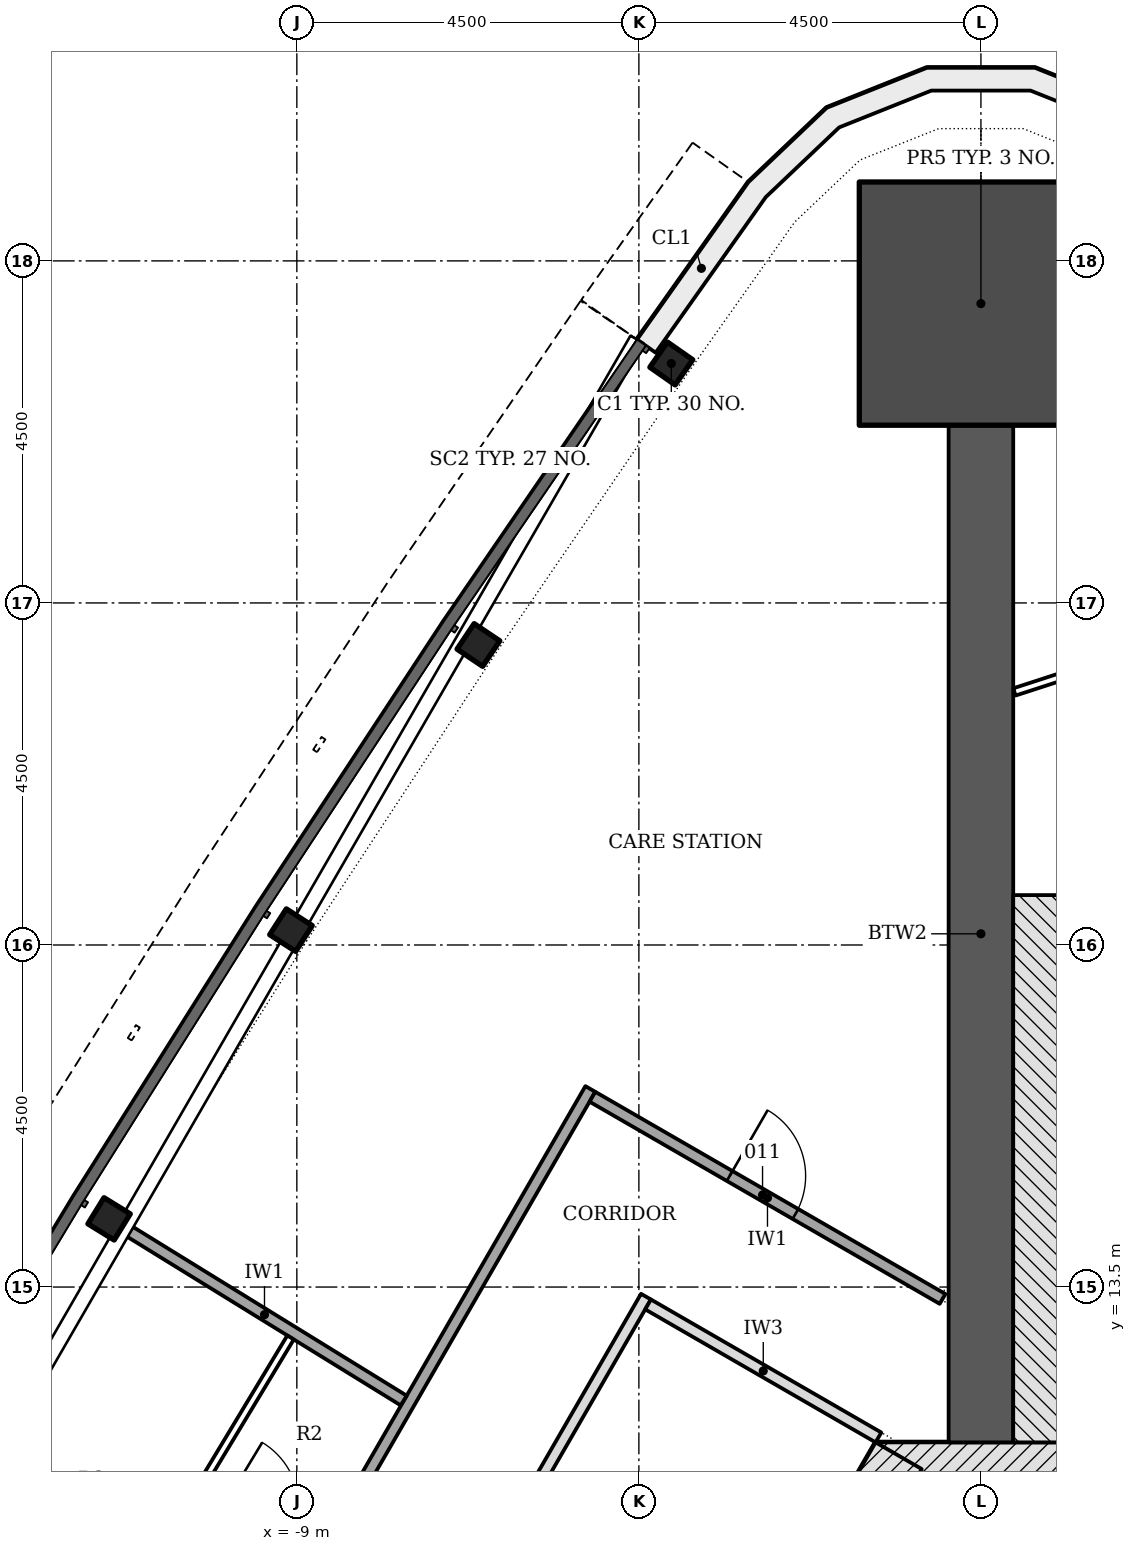
"""IFC4 building model, lengths in metres.
Left out: names, types, materials, properties, quantities, classifications, styles, units other than length and angle.
Written with IfcOpenShell. Run it as: python <this file> out.ifc"""

import sys

from ifc_helpers import new_model, si_unit, direction, frame, frame_2d, origin, origin_2d, place, context, subcontext, project, spatial, polyline, rectangle, i_section, outline, extrude, element, fill, save


model = new_model("IFC4")
c1 = context("Model", 3, precision=1e-05, world=origin(), true_north=direction((0.0, 1.0)))
c2 = subcontext(c1, "Body", "Model", "MODEL_VIEW")
j1 = project(units=[si_unit("LENGTHUNIT", "METRE"), si_unit("PLANEANGLEUNIT", "RADIAN")], contexts=[c1])
p1 = place(None, origin())
s1 = spatial("IfcSite", under=j1, at=p1, CompositionType="ELEMENT")
p2 = place(p1, origin())
s2 = spatial("IfcBuilding", under=s1, at=p2, CompositionType="ELEMENT")
p3 = place(p2, frame((0.0, 0.0, 72.6)))
s3 = spatial("IfcBuildingStorey", under=s2, at=p3, CompositionType="ELEMENT", Elevation=72.6)
p4 = place(p3, frame((10.311, -4.703, -0.2), z_axis=(0.0, 0.0, 1.0), x_axis=(-0.500001446645, 0.866024568562, 0.0)))
e1 = element("IfcWall", 1, at=p4, inside=s3, PredefinedType="SHEAR", context=c2, shape_type="SweptSolid", body=[
    extrude(rectangle(XDim=18.458, YDim=0.7, at=frame_2d((9.229, 0.0))), origin(), (0.0, 0.0, 1.0), 3.6),
])
p5 = place(p4, frame((9.5, 0.0, 0.2)))
e2 = element("IfcOpeningElement", 2, at=p5, cuts=e1, PredefinedType="OPENING", context=c2, shape_type="SweptSolid", body=[
    extrude(rectangle(XDim=1.0, YDim=2.1, at=frame_2d((0.5, 1.05))), frame((0.0, 0.36, 0.0), z_axis=(0.0, -1.0, 0.0), x_axis=(1.0, 0.0, 0.0)), (0.0, 0.0, 1.0), 0.72),
])
p6 = place(p4, frame((4.402, 0.0, 0.2)))
e3 = element("IfcOpeningElement", 3, at=p6, cuts=e1, PredefinedType="OPENING", context=c2, shape_type="SweptSolid", body=[
    extrude(rectangle(XDim=0.9, YDim=2.1, at=frame_2d((0.45, 1.05))), frame((0.0, 0.36, 0.0), z_axis=(0.0, -1.0, 0.0), x_axis=(1.0, 0.0, 0.0)), (0.0, 0.0, 1.0), 0.72),
])
p7 = place(p4, frame((13.927, 0.0, 0.2)))
e4 = element("IfcOpeningElement", 4, at=p7, cuts=e1, PredefinedType="OPENING", context=c2, shape_type="SweptSolid", body=[
    extrude(rectangle(XDim=0.9, YDim=2.1, at=frame_2d((0.45, 1.05))), frame((0.0, 0.36, 0.0), z_axis=(0.0, -1.0, 0.0), x_axis=(1.0, 0.0, 0.0)), (0.0, 0.0, 1.0), 0.72),
])
p8 = place(p3, frame((1.386, 11.106, -0.2), z_axis=(0.0, 0.0, 1.0), x_axis=(-1.0, 0.0, 0.0)))
e5 = element("IfcWall", 5, at=p8, inside=s3, PredefinedType="SHEAR", context=c2, shape_type="SweptSolid", body=[
    extrude(rectangle(XDim=2.771, YDim=0.7, at=frame_2d((1.386, 0.0))), origin(), (0.0, 0.0, 1.0), 3.6),
])
p9 = place(p3, frame((-1.083, 11.281, -0.2), z_axis=(0.0, 0.0, 1.0), x_axis=(-0.500001446645, -0.866024568562, 0.0)))
e6 = element("IfcWall", 6, at=p9, inside=s3, PredefinedType="SHEAR", context=c2, shape_type="SweptSolid", body=[
    extrude(rectangle(XDim=18.458, YDim=0.7, at=frame_2d((9.229, 0.0))), origin(), (0.0, 0.0, 1.0), 3.6),
])
p10 = place(p9, frame((8.979, 0.0, 0.2)))
e7 = element("IfcOpeningElement", 7, at=p10, cuts=e6, PredefinedType="OPENING", context=c2, shape_type="SweptSolid", body=[
    extrude(rectangle(XDim=1.2, YDim=2.1, at=frame_2d((0.6, 1.05))), frame((0.0, 0.36, 0.0), z_axis=(0.0, -1.0, 0.0), x_axis=(1.0, 0.0, 0.0)), (0.0, 0.0, 1.0), 0.72),
])
p11 = place(p9, frame((11.029, 0.0, 0.2)))
e8 = element("IfcOpeningElement", 8, at=p11, cuts=e6, PredefinedType="OPENING", context=c2, shape_type="SweptSolid", body=[
    extrude(rectangle(XDim=1.2, YDim=2.1, at=frame_2d((0.6, 1.05))), frame((0.0, 0.36, 0.0), z_axis=(0.0, -1.0, 0.0), x_axis=(1.0, 0.0, 0.0)), (0.0, 0.0, 1.0), 0.72),
])
p12 = place(p3, frame((0.0, 11.456, -0.2), z_axis=(0.0, 0.0, 1.0), x_axis=(0.0, 1.0, 0.0)))
e9 = element("IfcWall", 9, at=p12, inside=s3, PredefinedType="SHEAR", context=c2, shape_type="SweptSolid", body=[
    extrude(rectangle(XDim=13.382, YDim=0.85, at=frame_2d((6.691, 0.0))), origin(), (0.0, 0.0, 1.0), 3.6),
])
p13 = place(p3, frame((0.0, 26.438, -0.2), z_axis=(0.0, 0.0, 1.0), x_axis=(0.0, 1.0, 0.0)))
e10 = element("IfcColumn", 10, at=p13, inside=s3, PredefinedType="COLUMN", context=c2, shape_type="SweptSolid", body=[
    extrude(rectangle(XDim=3.2, YDim=3.2, at=origin_2d()), origin(), (0.0, 0.0, 1.0), 3.6),
])
for number, where, z_axis, x_axis in (
    (11, (-4.073, 25.65, -0.2), (0.0, 0.0, 1.0), (-0.573, -0.819, 0.0)),
    (12, (-6.611, 21.947, -0.2), (0.0, 0.0, 1.0), (-0.557, -0.83, 0.0)),
    (13, (-9.077, 18.195, -0.2), (0.0, 0.0, 1.0), (-0.541, -0.841, 0.0)),
    (14, (-11.47, 14.397, -0.2), (0.0, 0.0, 1.0), (-0.525, -0.851, 0.0)),
):
    element("IfcColumn", number, at=place(p3, frame(where, z_axis=z_axis, x_axis=x_axis)), inside=s3, PredefinedType="COLUMN", context=c2, shape_type="SweptSolid", body=[
        extrude(i_section(OverallWidth=0.404, OverallDepth=0.406, WebThickness=0.027, FlangeThickness=0.044, FilletRadius=0.015, at=origin_2d()), origin(), (0.0, 0.0, 1.0), 3.6),
    ])
p14 = place(p3, origin())
e15 = element("IfcWall", 15, at=p14, inside=s3, PredefinedType="NOTDEFINED", context=c2, shape_type="SweptSolid", body=[
    extrude(outline(polyline([(4.524, 25.965), (3.059, 28.036), (2.029, 29.014), (0.71, 29.54), (-0.71, 29.54), (-2.029, 29.014), (-3.059, 28.036), (-4.524, 25.965), (-4.279, 25.792), (-2.831, 27.839), (-1.865, 28.757), (-0.652, 29.24), (0.652, 29.24), (1.865, 28.757), (2.831, 27.839), (4.279, 25.792), (4.524, 25.965)])), origin(), (0.0, 0.0, 1.0), 3.3),
])
p15 = place(p3, frame((1.005, 11.456, -0.2), z_axis=(0.0, 0.0, 1.0), x_axis=(0.0, 1.0, 0.0)))
e16 = element("IfcWall", 16, at=p15, inside=s3, PredefinedType="SHEAR", context=c2, shape_type="SweptSolid", body=[
    extrude(rectangle(XDim=7.2, YDim=1.161, at=frame_2d((3.6, 0.0))), origin(), (0.0, 0.0, 1.0), 3.6),
])
p16 = place(p3, frame((-16.256, -3.149, 0.0), z_axis=(0.0, 0.0, 1.0), x_axis=(0.499999683919, 0.866025586274, 0.0)))
e17 = element("IfcWall", 17, at=p16, inside=s3, PredefinedType="PARTITIONING", context=c2, shape_type="SweptSolid", body=[
    extrude(rectangle(XDim=22.234, YDim=0.15, at=frame_2d((11.117, 0.0))), origin(), (0.0, 0.0, 1.0), 2.778),
])
p17 = place(p16, frame((13.551, 0.0, 0.0)))
e18 = element("IfcOpeningElement", 18, at=p17, cuts=e17, PredefinedType="OPENING", context=c2, shape_type="SweptSolid", body=[
    extrude(rectangle(XDim=1.0, YDim=2.1, at=frame_2d((0.5, 1.05))), frame((0.0, 0.085, 0.0), z_axis=(0.0, -1.0, 0.0), x_axis=(1.0, 0.0, 0.0)), (0.0, 0.0, 1.0), 0.17),
])
p18 = place(p16, frame((5.647, 0.0, 0.0)))
e19 = element("IfcOpeningElement", 19, at=p18, cuts=e17, PredefinedType="OPENING", context=c2, shape_type="SweptSolid", body=[
    extrude(rectangle(XDim=1.5, YDim=2.1, at=frame_2d((0.75, 1.05))), frame((0.0, 0.085, 0.0), z_axis=(0.0, -1.0, 0.0), x_axis=(1.0, 0.0, 0.0)), (0.0, 0.0, 1.0), 0.17),
])
p19 = place(p3, frame((-4.407, 13.374, 0.0), z_axis=(0.0, 0.0, 1.0), x_axis=(-0.499997181693, -0.866027030928, 0.0)))
e20 = element("IfcWall", 20, at=p19, inside=s3, PredefinedType="PARTITIONING", context=c2, shape_type="SweptSolid", body=[
    extrude(rectangle(XDim=16.77, YDim=0.15, at=frame_2d((8.385, 0.0))), origin(), (0.0, 0.0, 1.0), 2.778),
])
p20 = place(p19, frame((8.879, 0.0, 0.0)))
e21 = element("IfcOpeningElement", 21, at=p20, cuts=e20, PredefinedType="OPENING", context=c2, shape_type="SweptSolid", body=[
    extrude(rectangle(XDim=1.0, YDim=2.1, at=frame_2d((0.5, 1.05))), frame((0.0, 0.085, 0.0), z_axis=(0.0, -1.0, 0.0), x_axis=(1.0, 0.0, 0.0)), (0.0, 0.0, 1.0), 0.17),
])
p21 = place(p3, frame((-5.111, 16.003, 0.0), z_axis=(0.0, 0.0, 1.0), x_axis=(0.866034245675, -0.499984685083, 0.0)))
e22 = element("IfcWall", 22, at=p21, inside=s3, PredefinedType="PARTITIONING", context=c2, shape_type="SweptSolid", body=[
    extrude(rectangle(XDim=5.319, YDim=0.15, at=frame_2d((2.66, 0.0))), origin(), (0.0, 0.0, 1.0), 3.4),
])
p22 = place(p21, frame((2.084, 0.0, 0.0)))
e23 = element("IfcOpeningElement", 23, at=p22, cuts=e22, PredefinedType="OPENING", context=c2, shape_type="SweptSolid", body=[
    extrude(rectangle(XDim=1.0, YDim=2.1, at=frame_2d((0.5, 1.05))), frame((0.0, 0.085, 0.0), z_axis=(0.0, -1.0, 0.0), x_axis=(1.0, 0.0, 0.0)), (0.0, 0.0, 1.0), 0.17),
])
p23 = place(p3, frame((-4.379, 13.271, 0.0), z_axis=(0.0, 0.0, 1.0), x_axis=(0.866019471182, -0.500010275428, 0.0)))
e24 = element("IfcWall", 24, at=p23, inside=s3, PredefinedType="PARTITIONING", context=c2, shape_type="SweptSolid", body=[
    extrude(rectangle(XDim=3.5, YDim=0.15, at=frame_2d((1.75, 0.0))), origin(), (0.0, 0.0, 1.0), 3.4),
])
p24 = place(p3, frame((-11.257, 14.266, 0.0), z_axis=(0.0, 0.0, 1.0), x_axis=(0.851192414307, -0.524853764231, 0.0)))
e25 = element("IfcWall", 25, at=p24, inside=s3, PredefinedType="PARTITIONING", context=c2, shape_type="SweptSolid", body=[
    extrude(rectangle(XDim=4.303, YDim=0.15, at=frame_2d((2.152, 0.0))), origin(), (0.0, 0.0, 1.0), 2.778),
])
p25 = place(p3, frame((0.44, 21.329, 0.0), z_axis=(0.0, 0.0, 1.0), x_axis=(0.951171830883, 0.308661866992, 0.0)))
e26 = element("IfcWall", 26, at=p25, inside=s3, PredefinedType="PARTITIONING", context=c2, shape_type="SweptSolid", body=[
    extrude(rectangle(XDim=6.078, YDim=0.1, at=frame_2d((3.039, 0.0))), origin(), (0.0, 0.0, 1.0), 2.974),
])
p26 = place(p25, frame((2.197, 0.0, 0.0)))
e27 = element("IfcOpeningElement", 27, at=p26, cuts=e26, PredefinedType="OPENING", context=c2, shape_type="SweptSolid", body=[
    extrude(rectangle(XDim=1.0, YDim=2.1, at=frame_2d((0.5, 1.05))), frame((0.0, 0.06, 0.0), z_axis=(0.0, -1.0, 0.0), x_axis=(1.0, 0.0, 0.0)), (0.0, 0.0, 1.0), 0.12),
])
p27 = place(p3, frame((-9.083, 12.836, 0.0), z_axis=(0.0, 0.0, 1.0), x_axis=(-0.516596087141, -0.856229223252, 0.0)))
e28 = element("IfcWall", 28, at=p27, inside=s3, PredefinedType="PARTITIONING", context=c2, shape_type="SweptSolid", body=[
    extrude(rectangle(XDim=2.374, YDim=0.1, at=frame_2d((1.187, 0.0))), origin(), (0.0, 0.0, 1.0), 2.778),
])
p28 = place(p22, origin())
e29 = element("IfcDoor", 29, at=p28, inside=s3, OperationType="SINGLE_SWING_LEFT", PredefinedType="DOOR", context=c2, shape_type="SweptSolid", body=[
    extrude(rectangle(XDim=1.0, YDim=2.1, at=frame_2d((0.5, 1.05))), frame((0.0, 0.025, 0.0), z_axis=(0.0, -1.0, 0.0), x_axis=(1.0, 0.0, 0.0)), (0.0, 0.0, 1.0), 0.05),
])
fill(e23, e29)
save(model, sys.argv[1])
